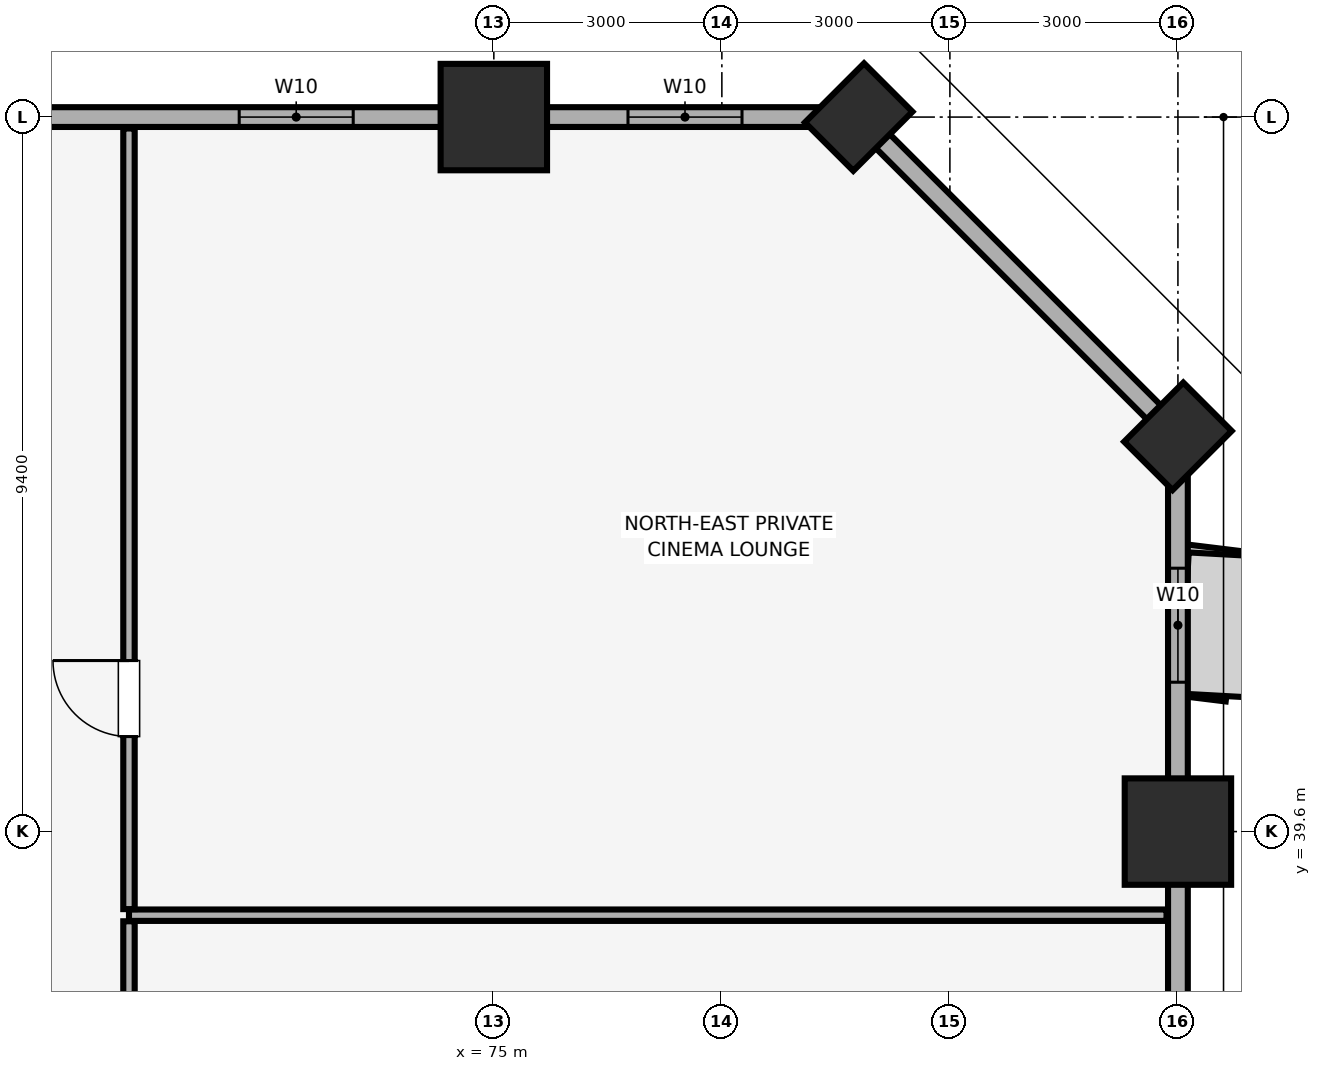
"""IFC4 building model, lengths in metres.
Left out: names, types, materials, properties, quantities, classifications, styles, units other than length and angle.
Written with IfcOpenShell. Run it as: python <this file> out.ifc"""

import sys

from ifc_helpers import new_model, si_unit, direction, frame, frame_2d, origin, origin_2d, place, context, subcontext, project, spatial, rectangle, extrude, element, fill, save


model = new_model("IFC4")
c1 = context("Model", 3, precision=1e-05, world=origin(), true_north=direction((0.0, 1.0)))
c2 = subcontext(c1, "Body", "Model", "MODEL_VIEW")
j1 = project(units=[si_unit("LENGTHUNIT", "METRE"), si_unit("PLANEANGLEUNIT", "RADIAN")], contexts=[c1])
p1 = place(None, origin())
s1 = spatial("IfcSite", under=j1, at=p1, CompositionType="ELEMENT")
p2 = place(p1, origin())
s2 = spatial("IfcBuilding", under=s1, at=p2, CompositionType="ELEMENT")
p3 = place(p2, frame((0.0, 0.0, 72.65)))
s3 = spatial("IfcBuildingStorey", under=s2, at=p3, CompositionType="ELEMENT", Elevation=72.65)
p4 = place(p3, frame((84.0, 39.6, 0.0), z_axis=(0.0, 0.0, 1.0), x_axis=(1.0, 0.0, 0.0)))
e1 = element("IfcColumn", 1, at=p4, inside=s3, PredefinedType="COLUMN", context=c2, shape_type="SweptSolid", body=[
    extrude(rectangle(XDim=1.4, YDim=1.4, at=origin_2d()), origin(), (0.0, 0.0, 1.0), 3.51),
])
for number, where, z_axis, x_axis in (
    (2, (84.0, 44.8, 0.0), (0.0, 0.0, 1.0), (0.707, 0.707, 0.0)),
    (3, (79.8, 49.0, 0.0), (0.0, 0.0, 1.0), (0.707, 0.707, 0.0)),
):
    element("IfcColumn", number, at=place(p3, frame(where, z_axis=z_axis, x_axis=x_axis)), inside=s3, PredefinedType="PILASTER", context=c2, shape_type="SweptSolid", body=[
        extrude(rectangle(XDim=1.1, YDim=0.9, at=origin_2d()), origin(), (0.0, 0.0, 1.0), 3.51),
    ])
p5 = place(p3, frame((75.0, 49.0, 0.0), z_axis=(0.0, 0.0, 1.0), x_axis=(1.0, 0.0, 0.0)))
e4 = element("IfcColumn", 4, at=p5, inside=s3, PredefinedType="COLUMN", context=c2, shape_type="SweptSolid", body=[
    extrude(rectangle(XDim=1.4, YDim=1.4, at=origin_2d()), origin(), (0.0, 0.0, 1.0), 3.51),
])
p6 = place(p3, frame((84.0, 4.2, 0.0), z_axis=(0.0, 0.0, 1.0), x_axis=(0.0, 1.0, 0.0)))
e5 = element("IfcWall", 5, at=p6, inside=s3, PredefinedType="SOLIDWALL", context=c2, shape_type="SweptSolid", body=[
    extrude(rectangle(XDim=40.6, YDim=0.26, at=frame_2d((20.3, 0.0))), origin(), (0.0, 0.0, 1.0), 2.56),
])
p7 = place(p6, frame((6.05, 0.0, 0.85)))
e6 = element("IfcOpeningElement", 6, at=p7, cuts=e5, PredefinedType="OPENING", context=c2, shape_type="SweptSolid", body=[
    extrude(rectangle(XDim=1.5, YDim=1.4, at=frame_2d((0.75, 0.7))), frame((0.0, 0.14, 0.0), z_axis=(0.0, -1.0, 0.0), x_axis=(1.0, 0.0, 0.0)), (0.0, 0.0, 1.0), 0.28),
])
p8 = place(p6, frame((12.35, 0.0, 0.85)))
e7 = element("IfcOpeningElement", 7, at=p8, cuts=e5, PredefinedType="OPENING", context=c2, shape_type="SweptSolid", body=[
    extrude(rectangle(XDim=1.5, YDim=1.4, at=frame_2d((0.75, 0.7))), frame((0.0, 0.14, 0.0), z_axis=(0.0, -1.0, 0.0), x_axis=(1.0, 0.0, 0.0)), (0.0, 0.0, 1.0), 0.28),
])
p9 = place(p6, frame((22.165, 0.0, 0.85)))
e8 = element("IfcOpeningElement", 8, at=p9, cuts=e5, PredefinedType="OPENING", context=c2, shape_type="SweptSolid", body=[
    extrude(rectangle(XDim=1.5, YDim=1.4, at=frame_2d((0.75, 0.7))), frame((0.0, 0.14, 0.0), z_axis=(0.0, -1.0, 0.0), x_axis=(1.0, 0.0, 0.0)), (0.0, 0.0, 1.0), 0.28),
])
p10 = place(p6, frame((29.2, 0.0, 0.85)))
e9 = element("IfcOpeningElement", 9, at=p10, cuts=e5, PredefinedType="OPENING", context=c2, shape_type="SweptSolid", body=[
    extrude(rectangle(XDim=1.5, YDim=1.4, at=frame_2d((0.75, 0.7))), frame((0.0, 0.14, 0.0), z_axis=(0.0, -1.0, 0.0), x_axis=(1.0, 0.0, 0.0)), (0.0, 0.0, 1.0), 0.28),
])
p11 = place(p6, frame((37.365, 0.0, 0.85)))
e10 = element("IfcOpeningElement", 10, at=p11, cuts=e5, PredefinedType="OPENING", context=c2, shape_type="SweptSolid", body=[
    extrude(rectangle(XDim=1.5, YDim=1.4, at=frame_2d((0.75, 0.7))), frame((0.0, 0.14, 0.0), z_axis=(0.0, -1.0, 0.0), x_axis=(1.0, 0.0, 0.0)), (0.0, 0.0, 1.0), 0.28),
])
p12 = place(p3, frame((84.0, 44.8, 0.0), z_axis=(0.0, 0.0, 1.0), x_axis=(-0.707106781187, 0.707106781187, 0.0)))
e11 = element("IfcWall", 11, at=p12, inside=s3, PredefinedType="SOLIDWALL", context=c2, shape_type="SweptSolid", body=[
    extrude(rectangle(XDim=5.94, YDim=0.26, at=frame_2d((2.97, 0.0))), origin(), (0.0, 0.0, 1.0), 2.56),
])
p13 = place(p3, frame((79.8, 49.0, 0.0), z_axis=(0.0, 0.0, 1.0), x_axis=(-1.0, 0.0, 0.0)))
e12 = element("IfcWall", 12, at=p13, inside=s3, PredefinedType="SOLIDWALL", context=c2, shape_type="SweptSolid", body=[
    extrude(rectangle(XDim=75.6, YDim=0.26, at=frame_2d((37.8, 0.0))), origin(), (0.0, 0.0, 1.0), 2.56),
])
p14 = place(p13, frame((72.565, 0.0, 0.85)))
e13 = element("IfcOpeningElement", 13, at=p14, cuts=e12, PredefinedType="OPENING", context=c2, shape_type="SweptSolid", body=[
    extrude(rectangle(XDim=1.5, YDim=1.4, at=frame_2d((0.75, 0.7))), frame((0.0, 0.14, 0.0), z_axis=(0.0, -1.0, 0.0), x_axis=(1.0, 0.0, 0.0)), (0.0, 0.0, 1.0), 0.28),
])
p15 = place(p13, frame((67.45, 0.0, 0.85)))
e14 = element("IfcOpeningElement", 14, at=p15, cuts=e12, PredefinedType="OPENING", context=c2, shape_type="SweptSolid", body=[
    extrude(rectangle(XDim=1.5, YDim=1.4, at=frame_2d((0.75, 0.7))), frame((0.0, 0.14, 0.0), z_axis=(0.0, -1.0, 0.0), x_axis=(1.0, 0.0, 0.0)), (0.0, 0.0, 1.0), 0.28),
])
p16 = place(p13, frame((6.65, 0.0, 0.85)))
e15 = element("IfcOpeningElement", 15, at=p16, cuts=e12, PredefinedType="OPENING", context=c2, shape_type="SweptSolid", body=[
    extrude(rectangle(XDim=1.5, YDim=1.4, at=frame_2d((0.75, 0.7))), frame((0.0, 0.14, 0.0), z_axis=(0.0, -1.0, 0.0), x_axis=(1.0, 0.0, 0.0)), (0.0, 0.0, 1.0), 0.28),
])
p17 = place(p13, frame((1.535, 0.0, 0.85)))
e16 = element("IfcOpeningElement", 16, at=p17, cuts=e12, PredefinedType="OPENING", context=c2, shape_type="SweptSolid", body=[
    extrude(rectangle(XDim=1.5, YDim=1.4, at=frame_2d((0.75, 0.7))), frame((0.0, 0.14, 0.0), z_axis=(0.0, -1.0, 0.0), x_axis=(1.0, 0.0, 0.0)), (0.0, 0.0, 1.0), 0.28),
])
p18 = place(p13, frame((51.365, 0.0, 0.9)))
e17 = element("IfcOpeningElement", 17, at=p18, cuts=e12, PredefinedType="OPENING", context=c2, shape_type="SweptSolid", body=[
    extrude(rectangle(XDim=1.5, YDim=1.4, at=frame_2d((0.75, 0.7))), frame((0.0, 0.14, 0.0), z_axis=(0.0, -1.0, 0.0), x_axis=(1.0, 0.0, 0.0)), (0.0, 0.0, 1.0), 0.28),
])
p19 = place(p13, frame((44.55, 0.0, 0.9)))
e18 = element("IfcOpeningElement", 18, at=p19, cuts=e12, PredefinedType="OPENING", context=c2, shape_type="SweptSolid", body=[
    extrude(rectangle(XDim=1.5, YDim=1.4, at=frame_2d((0.75, 0.7))), frame((0.0, 0.14, 0.0), z_axis=(0.0, -1.0, 0.0), x_axis=(1.0, 0.0, 0.0)), (0.0, 0.0, 1.0), 0.28),
])
p20 = place(p13, frame((28.1, 0.0, 0.9)))
e19 = element("IfcOpeningElement", 19, at=p20, cuts=e12, PredefinedType="OPENING", context=c2, shape_type="SweptSolid", body=[
    extrude(rectangle(XDim=1.5, YDim=1.4, at=frame_2d((0.75, 0.7))), frame((0.0, 0.14, 0.0), z_axis=(0.0, -1.0, 0.0), x_axis=(1.0, 0.0, 0.0)), (0.0, 0.0, 1.0), 0.28),
])
p21 = place(p13, frame((23.485, 0.0, 0.9)))
e20 = element("IfcOpeningElement", 20, at=p21, cuts=e12, PredefinedType="OPENING", context=c2, shape_type="SweptSolid", body=[
    extrude(rectangle(XDim=1.5, YDim=1.4, at=frame_2d((0.75, 0.7))), frame((0.0, 0.14, 0.0), z_axis=(0.0, -1.0, 0.0), x_axis=(1.0, 0.0, 0.0)), (0.0, 0.0, 1.0), 0.28),
])
p22 = place(p3, frame((70.2, 38.5, 0.0), z_axis=(0.0, 0.0, 1.0), x_axis=(1.0, 0.0, 0.0)))
e21 = element("IfcWall", 21, at=p22, inside=s3, PredefinedType="PARTITIONING", context=c2, shape_type="SweptSolid", body=[
    extrude(rectangle(XDim=13.65, YDim=0.15, at=frame_2d((6.825, 0.0))), origin(), (0.0, 0.0, 1.0), 3.51),
])
p23 = place(p3, frame((70.2, 29.495, 0.0), z_axis=(0.0, 0.0, 1.0), x_axis=(0.0, 1.0, 0.0)))
e22 = element("IfcWall", 22, at=p23, inside=s3, PredefinedType="PARTITIONING", context=c2, shape_type="SweptSolid", body=[
    extrude(rectangle(XDim=8.925, YDim=0.15, at=frame_2d((4.462, 0.0))), origin(), (0.0, 0.0, 1.0), 3.51),
])
p24 = place(p23, frame((3.955, 0.0, 0.0)))
e23 = element("IfcOpeningElement", 23, at=p24, cuts=e22, PredefinedType="OPENING", context=c2, shape_type="SweptSolid", body=[
    extrude(rectangle(XDim=1.0, YDim=2.15, at=frame_2d((0.5, 1.075))), frame((0.0, 0.085, 0.0), z_axis=(0.0, -1.0, 0.0), x_axis=(1.0, 0.0, 0.0)), (0.0, 0.0, 1.0), 0.17),
])
p25 = place(p3, frame((70.2, 38.58, 0.0), z_axis=(0.0, 0.0, 1.0), x_axis=(0.0, 1.0, 0.0)))
e24 = element("IfcWall", 24, at=p25, inside=s3, PredefinedType="PARTITIONING", context=c2, shape_type="SweptSolid", body=[
    extrude(rectangle(XDim=10.27, YDim=0.15, at=frame_2d((5.135, 0.0))), origin(), (0.0, 0.0, 1.0), 3.51),
])
p26 = place(p25, frame((2.27, 0.0, 0.0)))
e25 = element("IfcOpeningElement", 25, at=p26, cuts=e24, PredefinedType="OPENING", context=c2, shape_type="SweptSolid", body=[
    extrude(rectangle(XDim=1.0, YDim=2.15, at=frame_2d((0.5, 1.075))), frame((0.0, 0.085, 0.0), z_axis=(0.0, -1.0, 0.0), x_axis=(1.0, 0.0, 0.0)), (0.0, 0.0, 1.0), 0.17),
])
p27 = place(p11, origin())
e26 = element("IfcWindow", 26, at=p27, inside=s3, PartitioningType="SINGLE_PANEL", PredefinedType="WINDOW", context=c2, shape_type="SweptSolid", body=[
    extrude(rectangle(XDim=1.5, YDim=1.4, at=frame_2d((0.75, 0.7))), frame((0.0, 0.03, 0.0), z_axis=(0.0, -1.0, 0.0), x_axis=(1.0, 0.0, 0.0)), (0.0, 0.0, 1.0), 0.06),
])
fill(e10, e26)
p28 = place(p16, origin())
e27 = element("IfcWindow", 27, at=p28, inside=s3, PartitioningType="SINGLE_PANEL", PredefinedType="WINDOW", context=c2, shape_type="SweptSolid", body=[
    extrude(rectangle(XDim=1.5, YDim=1.4, at=frame_2d((0.75, 0.7))), frame((0.0, 0.03, 0.0), z_axis=(0.0, -1.0, 0.0), x_axis=(1.0, 0.0, 0.0)), (0.0, 0.0, 1.0), 0.06),
])
fill(e15, e27)
p29 = place(p17, origin())
e28 = element("IfcWindow", 28, at=p29, inside=s3, PartitioningType="SINGLE_PANEL", PredefinedType="WINDOW", context=c2, shape_type="SweptSolid", body=[
    extrude(rectangle(XDim=1.5, YDim=1.4, at=frame_2d((0.75, 0.7))), frame((0.0, 0.03, 0.0), z_axis=(0.0, -1.0, 0.0), x_axis=(1.0, 0.0, 0.0)), (0.0, 0.0, 1.0), 0.06),
])
fill(e16, e28)
p30 = place(p26, origin())
e29 = element("IfcDoor", 29, at=p30, inside=s3, OperationType="SINGLE_SWING_RIGHT", PredefinedType="DOOR", context=c2, shape_type="SweptSolid", body=[
    extrude(rectangle(XDim=1.0, YDim=2.15, at=frame_2d((0.5, 1.075))), frame((0.0, 0.025, 0.0), z_axis=(0.0, -1.0, 0.0), x_axis=(1.0, 0.0, 0.0)), (0.0, 0.0, 1.0), 0.05),
])
fill(e25, e29)
save(model, sys.argv[1])
